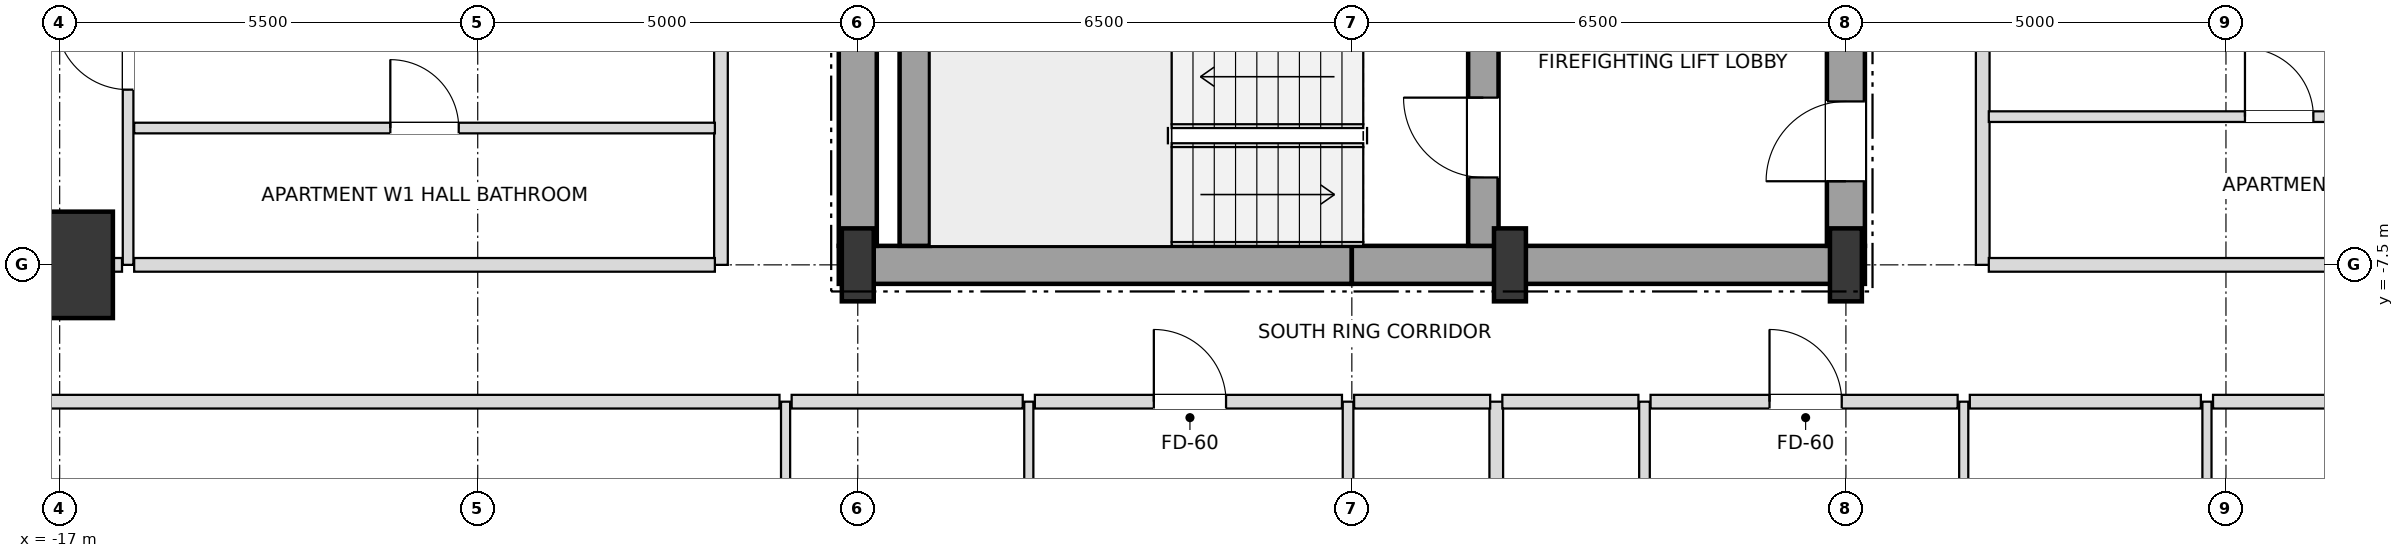
"""IFC4 building model, lengths in metres.
Left out: names, types, materials, properties, quantities, classifications, styles, units other than length and angle.
Written with IfcOpenShell. Run it as: python <this file> out.ifc"""

import sys

from ifc_helpers import new_model, si_unit, direction, frame, frame_2d, origin, origin_2d, place, context, subcontext, project, spatial, rectangle, i_section, extrude, element, fill, save


model = new_model("IFC4")
c1 = context("Model", 3, precision=1e-05, world=origin(), true_north=direction((0.0, 1.0)))
c2 = subcontext(c1, "Body", "Model", "MODEL_VIEW")
j1 = project(units=[si_unit("LENGTHUNIT", "METRE"), si_unit("PLANEANGLEUNIT", "RADIAN")], contexts=[c1])
p1 = place(None, origin())
s1 = spatial("IfcSite", under=j1, at=p1, CompositionType="ELEMENT")
p2 = place(p1, origin())
s2 = spatial("IfcBuilding", under=s1, at=p2, CompositionType="ELEMENT")
p3 = place(p2, frame((0.0, 0.0, 36.0)))
s3 = spatial("IfcBuildingStorey", under=s2, at=p3, CompositionType="ELEMENT", Elevation=36.0)
for number, where, z_axis, x_axis in (
    (1, (-6.5, -7.5, 0.0), (0.0, 0.0, 1.0), (1.0, 0.0, 0.0)),
    (2, (2.08, -7.5, 0.0), (0.0, 0.0, 1.0), (1.0, 0.0, 0.0)),
    (3, (6.5, -7.5, 0.0), (0.0, 0.0, 1.0), (1.0, 0.0, 0.0)),
):
    element("IfcColumn", number, at=place(p3, frame(where, z_axis=z_axis, x_axis=x_axis)), inside=s3, PredefinedType="COLUMN", context=c2, shape_type="SweptSolid", body=[
        extrude(i_section(OverallWidth=0.42, OverallDepth=0.96, WebThickness=0.022, FlangeThickness=0.034, at=origin_2d()), origin(), (0.0, 0.0, 1.0), 3.6),
    ])
p4 = place(p3, frame((-17.0, -7.5, 0.0), z_axis=(0.0, 0.0, 1.0), x_axis=(1.0, 0.0, 0.0)))
e4 = element("IfcColumn", 4, at=p4, inside=s3, PredefinedType="USERDEFINED", context=c2, shape_type="SweptSolid", body=[
    extrude(rectangle(XDim=1.4, YDim=1.4, at=origin_2d()), origin(), (0.0, 0.0, 1.0), 3.6),
])
for number, where, z_axis, x_axis in (
    (5, (-6.75, -7.5, 0.0), (0.0, 0.0, 1.0), (1.0, 0.0, 0.0)),
    (6, (0.0, -7.5, 0.0), (0.0, 0.0, 1.0), (1.0, 0.0, 0.0)),
):
    element("IfcWall", number, at=place(p3, frame(where, z_axis=z_axis, x_axis=x_axis)), inside=s3, PredefinedType="SHEAR", context=c2, shape_type="SweptSolid", body=[
        extrude(rectangle(XDim=6.75, YDim=0.5, at=frame_2d((3.375, 0.0))), origin(), (0.0, 0.0, 1.0), 3.38),
    ])
p5 = place(p3, frame((-6.5, -7.25, 0.0), z_axis=(0.0, 0.0, 1.0), x_axis=(0.0, 1.0, 0.0)))
e7 = element("IfcWall", 7, at=p5, inside=s3, PredefinedType="SHEAR", context=c2, shape_type="SweptSolid", body=[
    extrude(rectangle(XDim=3.55, YDim=0.5, at=frame_2d((1.775, 0.0))), origin(), (0.0, 0.0, 1.0), 3.38),
])
p6 = place(p3, frame((6.5, -7.25, 0.0), z_axis=(0.0, 0.0, 1.0), x_axis=(0.0, 1.0, 0.0)))
e8 = element("IfcWall", 8, at=p6, inside=s3, PredefinedType="SHEAR", context=c2, shape_type="SweptSolid", body=[
    extrude(rectangle(XDim=5.75, YDim=0.5, at=frame_2d((2.875, 0.0))), origin(), (0.0, 0.0, 1.0), 3.38),
])
p7 = place(p6, frame((0.85, 0.0, 0.0)))
e9 = element("IfcOpeningElement", 9, at=p7, cuts=e8, PredefinedType="OPENING", context=c2, shape_type="SweptSolid", body=[
    extrude(rectangle(XDim=1.05, YDim=2.15, at=frame_2d((0.525, 1.075))), frame((0.0, 0.26, 0.0), z_axis=(0.0, -1.0, 0.0), x_axis=(1.0, 0.0, 0.0)), (0.0, 0.0, 1.0), 0.52),
])
p8 = place(p3, frame((-5.75, -7.25, 0.0), z_axis=(0.0, 0.0, 1.0), x_axis=(0.0, 1.0, 0.0)))
e10 = element("IfcWall", 10, at=p8, inside=s3, PredefinedType="SHEAR", context=c2, shape_type="SweptSolid", body=[
    extrude(rectangle(XDim=2.9, YDim=0.4, at=frame_2d((1.45, 0.0))), origin(), (0.0, 0.0, 1.0), 3.38),
])
p9 = place(p3, frame((1.73, -7.25, 0.0), z_axis=(0.0, 0.0, 1.0), x_axis=(0.0, 1.0, 0.0)))
e11 = element("IfcWall", 11, at=p9, inside=s3, PredefinedType="SHEAR", context=c2, shape_type="SweptSolid", body=[
    extrude(rectangle(XDim=3.3, YDim=0.4, at=frame_2d((1.65, 0.0))), origin(), (0.0, 0.0, 1.0), 3.38),
])
p10 = place(p9, frame((0.9, 0.0, 0.0)))
e12 = element("IfcOpeningElement", 12, at=p10, cuts=e11, PredefinedType="OPENING", context=c2, shape_type="SweptSolid", body=[
    extrude(rectangle(XDim=1.05, YDim=2.15, at=frame_2d((0.525, 1.075))), frame((0.0, 0.21, 0.0), z_axis=(0.0, -1.0, 0.0), x_axis=(1.0, 0.0, 0.0)), (0.0, 0.0, 1.0), 0.42),
])
p11 = place(p3, frame((-16.1, -7.5, 0.0), z_axis=(0.0, 0.0, 1.0), x_axis=(0.0, 1.0, 0.0)))
e13 = element("IfcWall", 13, at=p11, inside=s3, PredefinedType="PARTITIONING", context=c2, shape_type="SweptSolid", body=[
    extrude(rectangle(XDim=15.0, YDim=0.14, at=frame_2d((7.5, 0.0))), origin(), (0.0, 0.0, 1.0), 3.38),
])
p12 = place(p11, frame((2.305, 0.0, 0.0)))
e14 = element("IfcOpeningElement", 14, at=p12, cuts=e13, PredefinedType="OPENING", context=c2, shape_type="SweptSolid", body=[
    extrude(rectangle(XDim=0.95, YDim=2.1, at=frame_2d((0.475, 1.05))), frame((0.0, 0.08, 0.0), z_axis=(0.0, -1.0, 0.0), x_axis=(1.0, 0.0, 0.0)), (0.0, 0.0, 1.0), 0.16),
])
p13 = place(p11, frame((10.795, 0.0, 0.0)))
e15 = element("IfcOpeningElement", 15, at=p13, cuts=e13, PredefinedType="OPENING", context=c2, shape_type="SweptSolid", body=[
    extrude(rectangle(XDim=0.95, YDim=2.1, at=frame_2d((0.475, 1.05))), frame((0.0, 0.08, 0.0), z_axis=(0.0, -1.0, 0.0), x_axis=(1.0, 0.0, 0.0)), (0.0, 0.0, 1.0), 0.16),
])
p14 = place(p3, frame((-8.3, -7.5, 0.0), z_axis=(0.0, 0.0, 1.0), x_axis=(0.0, 1.0, 0.0)))
e16 = element("IfcWall", 16, at=p14, inside=s3, PredefinedType="PARTITIONING", context=c2, shape_type="SweptSolid", body=[
    extrude(rectangle(XDim=15.0, YDim=0.18, at=frame_2d((7.5, 0.0))), origin(), (0.0, 0.0, 1.0), 3.38),
])
p15 = place(p14, frame((3.565, 0.0, 0.0)))
e17 = element("IfcOpeningElement", 17, at=p15, cuts=e16, PredefinedType="OPENING", context=c2, shape_type="SweptSolid", body=[
    extrude(rectangle(XDim=0.95, YDim=2.15, at=frame_2d((0.475, 1.075))), frame((0.0, 0.1, 0.0), z_axis=(0.0, -1.0, 0.0), x_axis=(1.0, 0.0, 0.0)), (0.0, 0.0, 1.0), 0.2),
])
p16 = place(p14, frame((11.145, 0.0, 0.0)))
e18 = element("IfcOpeningElement", 18, at=p16, cuts=e16, PredefinedType="OPENING", context=c2, shape_type="SweptSolid", body=[
    extrude(rectangle(XDim=0.95, YDim=2.15, at=frame_2d((0.475, 1.075))), frame((0.0, 0.1, 0.0), z_axis=(0.0, -1.0, 0.0), x_axis=(1.0, 0.0, 0.0)), (0.0, 0.0, 1.0), 0.2),
])
p17 = place(p3, frame((-7.45, -18.9, 0.0), z_axis=(0.0, 0.0, 1.0), x_axis=(0.0, 1.0, 0.0)))
e19 = element("IfcWall", 19, at=p17, inside=s3, PredefinedType="PARTITIONING", context=c2, shape_type="SweptSolid", body=[
    extrude(rectangle(XDim=9.6, YDim=0.12, at=frame_2d((4.8, 0.0))), origin(), (0.0, 0.0, 1.0), 2.816),
])
p18 = place(p17, frame((4.35, 0.0, 0.0)))
e20 = element("IfcOpeningElement", 20, at=p18, cuts=e19, PredefinedType="OPENING", context=c2, shape_type="SweptSolid", body=[
    extrude(rectangle(XDim=0.9, YDim=2.1, at=frame_2d((0.45, 1.05))), frame((0.0, 0.07, 0.0), z_axis=(0.0, -1.0, 0.0), x_axis=(1.0, 0.0, 0.0)), (0.0, 0.0, 1.0), 0.14),
])
p19 = place(p3, frame((-4.25, -24.9, 0.0), z_axis=(0.0, 0.0, 1.0), x_axis=(0.0, 1.0, 0.0)))
e21 = element("IfcWall", 21, at=p19, inside=s3, PredefinedType="PARTITIONING", context=c2, shape_type="SweptSolid", body=[
    extrude(rectangle(XDim=15.6, YDim=0.12, at=frame_2d((7.8, 0.0))), origin(), (0.0, 0.0, 1.0), 2.816),
])
p20 = place(p19, frame((10.325, 0.0, 0.0)))
e22 = element("IfcOpeningElement", 22, at=p20, cuts=e21, PredefinedType="OPENING", context=c2, shape_type="SweptSolid", body=[
    extrude(rectangle(XDim=0.95, YDim=2.1, at=frame_2d((0.475, 1.05))), frame((0.0, 0.07, 0.0), z_axis=(0.0, -1.0, 0.0), x_axis=(1.0, 0.0, 0.0)), (0.0, 0.0, 1.0), 0.14),
])
p21 = place(p19, frame((2.55, 0.0, 0.0)))
e23 = element("IfcOpeningElement", 23, at=p21, cuts=e21, PredefinedType="OPENING", context=c2, shape_type="SweptSolid", body=[
    extrude(rectangle(XDim=0.9, YDim=2.1, at=frame_2d((0.45, 1.05))), frame((0.0, 0.07, 0.0), z_axis=(0.0, -1.0, 0.0), x_axis=(1.0, 0.0, 0.0)), (0.0, 0.0, 1.0), 0.14),
])
p22 = place(p3, frame((-0.05, -18.9, 0.0), z_axis=(0.0, 0.0, 1.0), x_axis=(0.0, 1.0, 0.0)))
e24 = element("IfcWall", 24, at=p22, inside=s3, PredefinedType="PARTITIONING", context=c2, shape_type="SweptSolid", body=[
    extrude(rectangle(XDim=9.6, YDim=0.14, at=frame_2d((4.8, 0.0))), origin(), (0.0, 0.0, 1.0), 2.948),
])
p23 = place(p22, frame((4.35, 0.0, 0.0)))
e25 = element("IfcOpeningElement", 25, at=p23, cuts=e24, PredefinedType="OPENING", context=c2, shape_type="SweptSolid", body=[
    extrude(rectangle(XDim=0.9, YDim=2.1, at=frame_2d((0.45, 1.05))), frame((0.0, 0.08, 0.0), z_axis=(0.0, -1.0, 0.0), x_axis=(1.0, 0.0, 0.0)), (0.0, 0.0, 1.0), 0.16),
])
p24 = place(p3, frame((1.9, -24.9, 0.0), z_axis=(0.0, 0.0, 1.0), x_axis=(0.0, 1.0, 0.0)))
e26 = element("IfcWall", 26, at=p24, inside=s3, PredefinedType="PARTITIONING", context=c2, shape_type="SweptSolid", body=[
    extrude(rectangle(XDim=15.6, YDim=0.18, at=frame_2d((7.8, 0.0))), origin(), (0.0, 0.0, 1.0), 2.816),
])
p25 = place(p3, frame((3.85, -18.9, 0.0), z_axis=(0.0, 0.0, 1.0), x_axis=(0.0, 1.0, 0.0)))
e27 = element("IfcWall", 27, at=p25, inside=s3, PredefinedType="PARTITIONING", context=c2, shape_type="SweptSolid", body=[
    extrude(rectangle(XDim=9.6, YDim=0.14, at=frame_2d((4.8, 0.0))), origin(), (0.0, 0.0, 1.0), 2.948),
])
p26 = place(p25, frame((4.35, 0.0, 0.0)))
e28 = element("IfcOpeningElement", 28, at=p26, cuts=e27, PredefinedType="OPENING", context=c2, shape_type="SweptSolid", body=[
    extrude(rectangle(XDim=0.9, YDim=2.1, at=frame_2d((0.45, 1.05))), frame((0.0, 0.08, 0.0), z_axis=(0.0, -1.0, 0.0), x_axis=(1.0, 0.0, 0.0)), (0.0, 0.0, 1.0), 0.16),
])
p27 = place(p3, frame((8.05, -24.9, 0.0), z_axis=(0.0, 0.0, 1.0), x_axis=(0.0, 1.0, 0.0)))
e29 = element("IfcWall", 29, at=p27, inside=s3, PredefinedType="PARTITIONING", context=c2, shape_type="SweptSolid", body=[
    extrude(rectangle(XDim=15.6, YDim=0.12, at=frame_2d((7.8, 0.0))), origin(), (0.0, 0.0, 1.0), 2.816),
])
p28 = place(p27, frame((10.325, 0.0, 0.0)))
e30 = element("IfcOpeningElement", 30, at=p28, cuts=e29, PredefinedType="OPENING", context=c2, shape_type="SweptSolid", body=[
    extrude(rectangle(XDim=0.95, YDim=2.1, at=frame_2d((0.475, 1.05))), frame((0.0, 0.07, 0.0), z_axis=(0.0, -1.0, 0.0), x_axis=(1.0, 0.0, 0.0)), (0.0, 0.0, 1.0), 0.14),
])
p29 = place(p27, frame((2.55, 0.0, 0.0)))
e31 = element("IfcOpeningElement", 31, at=p29, cuts=e29, PredefinedType="OPENING", context=c2, shape_type="SweptSolid", body=[
    extrude(rectangle(XDim=0.9, YDim=2.1, at=frame_2d((0.45, 1.05))), frame((0.0, 0.07, 0.0), z_axis=(0.0, -1.0, 0.0), x_axis=(1.0, 0.0, 0.0)), (0.0, 0.0, 1.0), 0.14),
])
p30 = place(p3, frame((8.3, -7.5, 0.0), z_axis=(0.0, 0.0, 1.0), x_axis=(0.0, 1.0, 0.0)))
e32 = element("IfcWall", 32, at=p30, inside=s3, PredefinedType="PARTITIONING", context=c2, shape_type="SweptSolid", body=[
    extrude(rectangle(XDim=15.0, YDim=0.18, at=frame_2d((7.5, 0.0))), origin(), (0.0, 0.0, 1.0), 3.38),
])
p31 = place(p30, frame((3.475, 0.0, 0.0)))
e33 = element("IfcOpeningElement", 33, at=p31, cuts=e32, PredefinedType="OPENING", context=c2, shape_type="SweptSolid", body=[
    extrude(rectangle(XDim=0.95, YDim=2.15, at=frame_2d((0.475, 1.075))), frame((0.0, 0.1, 0.0), z_axis=(0.0, -1.0, 0.0), x_axis=(1.0, 0.0, 0.0)), (0.0, 0.0, 1.0), 0.2),
])
p32 = place(p3, frame((11.25, -18.9, 0.0), z_axis=(0.0, 0.0, 1.0), x_axis=(0.0, 1.0, 0.0)))
e34 = element("IfcWall", 34, at=p32, inside=s3, PredefinedType="PARTITIONING", context=c2, shape_type="SweptSolid", body=[
    extrude(rectangle(XDim=9.6, YDim=0.12, at=frame_2d((4.8, 0.0))), origin(), (0.0, 0.0, 1.0), 2.736),
])
p33 = place(p32, frame((4.325, 0.0, 0.0)))
e35 = element("IfcOpeningElement", 35, at=p33, cuts=e34, PredefinedType="OPENING", context=c2, shape_type="SweptSolid", body=[
    extrude(rectangle(XDim=0.95, YDim=2.1, at=frame_2d((0.475, 1.05))), frame((0.0, 0.07, 0.0), z_axis=(0.0, -1.0, 0.0), x_axis=(1.0, 0.0, 0.0)), (0.0, 0.0, 1.0), 0.14),
])
p34 = place(p3, frame((-18.32, -9.3, 0.0), z_axis=(0.0, 0.0, 1.0), x_axis=(1.0, 0.0, 0.0)))
e36 = element("IfcWall", 36, at=p34, inside=s3, PredefinedType="PARTITIONING", context=c2, shape_type="SweptSolid", body=[
    extrude(rectangle(XDim=10.79, YDim=0.18, at=frame_2d((5.395, 0.0))), origin(), (0.0, 0.0, 1.0), 2.816),
])
p35 = place(p3, frame((-7.37, -9.3, 0.0), z_axis=(0.0, 0.0, 1.0), x_axis=(1.0, 0.0, 0.0)))
e37 = element("IfcWall", 37, at=p35, inside=s3, PredefinedType="PARTITIONING", context=c2, shape_type="SweptSolid", body=[
    extrude(rectangle(XDim=3.04, YDim=0.18, at=frame_2d((1.52, 0.0))), origin(), (0.0, 0.0, 1.0), 2.816),
])
p36 = place(p3, frame((-4.17, -9.3, 0.0), z_axis=(0.0, 0.0, 1.0), x_axis=(1.0, 0.0, 0.0)))
e38 = element("IfcWall", 38, at=p36, inside=s3, PredefinedType="PARTITIONING", context=c2, shape_type="SweptSolid", body=[
    extrude(rectangle(XDim=4.04, YDim=0.18, at=frame_2d((2.02, 0.0))), origin(), (0.0, 0.0, 1.0), 3.38),
])
p37 = place(p36, frame((1.565, 0.0, 0.0)))
e39 = element("IfcOpeningElement", 39, at=p37, cuts=e38, PredefinedType="OPENING", context=c2, shape_type="SweptSolid", body=[
    extrude(rectangle(XDim=0.95, YDim=2.15, at=frame_2d((0.475, 1.075))), frame((0.0, 0.1, 0.0), z_axis=(0.0, -1.0, 0.0), x_axis=(1.0, 0.0, 0.0)), (0.0, 0.0, 1.0), 0.2),
])
for number, where, z_axis, x_axis in (
    (40, (0.03, -9.3, 0.0), (0.0, 0.0, 1.0), (1.0, 0.0, 0.0)),
    (41, (1.98, -9.3, 0.0), (0.0, 0.0, 1.0), (1.0, 0.0, 0.0)),
):
    element("IfcWall", number, at=place(p3, frame(where, z_axis=z_axis, x_axis=x_axis)), inside=s3, PredefinedType="PARTITIONING", context=c2, shape_type="SweptSolid", body=[
        extrude(rectangle(XDim=1.79, YDim=0.18, at=frame_2d((0.895, 0.0))), origin(), (0.0, 0.0, 1.0), 3.38),
    ])
p38 = place(p3, frame((3.93, -9.3, 0.0), z_axis=(0.0, 0.0, 1.0), x_axis=(1.0, 0.0, 0.0)))
e42 = element("IfcWall", 42, at=p38, inside=s3, PredefinedType="PARTITIONING", context=c2, shape_type="SweptSolid", body=[
    extrude(rectangle(XDim=4.04, YDim=0.18, at=frame_2d((2.02, 0.0))), origin(), (0.0, 0.0, 1.0), 2.816),
])
p39 = place(p38, frame((1.565, 0.0, 0.0)))
e43 = element("IfcOpeningElement", 43, at=p39, cuts=e42, PredefinedType="OPENING", context=c2, shape_type="SweptSolid", body=[
    extrude(rectangle(XDim=0.95, YDim=2.15, at=frame_2d((0.475, 1.075))), frame((0.0, 0.1, 0.0), z_axis=(0.0, -1.0, 0.0), x_axis=(1.0, 0.0, 0.0)), (0.0, 0.0, 1.0), 0.2),
])
p40 = place(p3, frame((8.13, -9.3, 0.0), z_axis=(0.0, 0.0, 1.0), x_axis=(1.0, 0.0, 0.0)))
e44 = element("IfcWall", 44, at=p40, inside=s3, PredefinedType="PARTITIONING", context=c2, shape_type="SweptSolid", body=[
    extrude(rectangle(XDim=3.04, YDim=0.18, at=frame_2d((1.52, 0.0))), origin(), (0.0, 0.0, 1.0), 3.38),
])
p41 = place(p3, frame((11.33, -9.3, 0.0), z_axis=(0.0, 0.0, 1.0), x_axis=(1.0, 0.0, 0.0)))
e45 = element("IfcWall", 45, at=p41, inside=s3, PredefinedType="PARTITIONING", context=c2, shape_type="SweptSolid", body=[
    extrude(rectangle(XDim=6.99, YDim=0.18, at=frame_2d((3.495, 0.0))), origin(), (0.0, 0.0, 1.0), 2.816),
])
p42 = place(p3, frame((-21.9, -7.5, 0.0), z_axis=(0.0, 0.0, 1.0), x_axis=(1.0, 0.0, 0.0)))
e46 = element("IfcWall", 46, at=p42, inside=s3, PredefinedType="PARTITIONING", context=c2, shape_type="SweptSolid", body=[
    extrude(rectangle(XDim=5.72, YDim=0.18, at=frame_2d((2.86, 0.0))), origin(), (0.0, 0.0, 1.0), 2.816),
])
for number, where, z_axis, x_axis in (
    (47, (-16.02, -7.5, 0.0), (0.0, 0.0, 1.0), (1.0, 0.0, 0.0)),
    (48, (8.38, -7.5, 0.0), (0.0, 0.0, 1.0), (1.0, 0.0, 0.0)),
):
    element("IfcWall", number, at=place(p3, frame(where, z_axis=z_axis, x_axis=x_axis)), inside=s3, PredefinedType="PARTITIONING", context=c2, shape_type="SweptSolid", body=[
        extrude(rectangle(XDim=7.64, YDim=0.18, at=frame_2d((3.82, 0.0))), origin(), (0.0, 0.0, 1.0), 2.816),
    ])
p43 = place(p3, frame((-16.02, -5.7, 0.0), z_axis=(0.0, 0.0, 1.0), x_axis=(1.0, 0.0, 0.0)))
e49 = element("IfcWall", 49, at=p43, inside=s3, PredefinedType="PARTITIONING", context=c2, shape_type="SweptSolid", body=[
    extrude(rectangle(XDim=7.64, YDim=0.14, at=frame_2d((3.82, 0.0))), origin(), (0.0, 0.0, 1.0), 2.948),
])
p44 = place(p43, frame((3.37, 0.0, 0.0)))
e50 = element("IfcOpeningElement", 50, at=p44, cuts=e49, PredefinedType="OPENING", context=c2, shape_type="SweptSolid", body=[
    extrude(rectangle(XDim=0.9, YDim=2.1, at=frame_2d((0.45, 1.05))), frame((0.0, 0.08, 0.0), z_axis=(0.0, -1.0, 0.0), x_axis=(1.0, 0.0, 0.0)), (0.0, 0.0, 1.0), 0.16),
])
p45 = place(p3, frame((8.38, -5.55, 0.0), z_axis=(0.0, 0.0, 1.0), x_axis=(1.0, 0.0, 0.0)))
e51 = element("IfcWall", 51, at=p45, inside=s3, PredefinedType="PARTITIONING", context=c2, shape_type="SweptSolid", body=[
    extrude(rectangle(XDim=7.64, YDim=0.14, at=frame_2d((3.82, 0.0))), origin(), (0.0, 0.0, 1.0), 2.948),
])
p46 = place(p45, frame((3.37, 0.0, 0.0)))
e52 = element("IfcOpeningElement", 52, at=p46, cuts=e51, PredefinedType="OPENING", context=c2, shape_type="SweptSolid", body=[
    extrude(rectangle(XDim=0.9, YDim=2.1, at=frame_2d((0.45, 1.05))), frame((0.0, 0.08, 0.0), z_axis=(0.0, -1.0, 0.0), x_axis=(1.0, 0.0, 0.0)), (0.0, 0.0, 1.0), 0.16),
])
p47 = place(p7, origin())
e53 = element("IfcDoor", 53, at=p47, inside=s3, OperationType="SINGLE_SWING_LEFT", PredefinedType="DOOR", context=c2, shape_type="SweptSolid", body=[
    extrude(rectangle(XDim=1.05, YDim=2.15, at=frame_2d((0.525, 1.075))), frame((0.0, 0.025, 0.0), z_axis=(0.0, -1.0, 0.0), x_axis=(1.0, 0.0, 0.0)), (0.0, 0.0, 1.0), 0.05),
])
fill(e9, e53)
p48 = place(p10, origin())
e54 = element("IfcDoor", 54, at=p48, inside=s3, OperationType="SINGLE_SWING_RIGHT", PredefinedType="DOOR", context=c2, shape_type="SweptSolid", body=[
    extrude(rectangle(XDim=1.05, YDim=2.15, at=frame_2d((0.525, 1.075))), frame((0.0, 0.025, 0.0), z_axis=(0.0, -1.0, 0.0), x_axis=(1.0, 0.0, 0.0)), (0.0, 0.0, 1.0), 0.05),
])
fill(e12, e54)
p49 = place(p37, origin())
e55 = element("IfcDoor", 55, at=p49, inside=s3, OperationType="SINGLE_SWING_LEFT", PredefinedType="DOOR", context=c2, shape_type="SweptSolid", body=[
    extrude(rectangle(XDim=0.95, YDim=2.15, at=frame_2d((0.475, 1.075))), frame((0.0, 0.025, 0.0), z_axis=(0.0, -1.0, 0.0), x_axis=(1.0, 0.0, 0.0)), (0.0, 0.0, 1.0), 0.05),
])
fill(e39, e55)
p50 = place(p39, origin())
e56 = element("IfcDoor", 56, at=p50, inside=s3, OperationType="SINGLE_SWING_LEFT", PredefinedType="DOOR", context=c2, shape_type="SweptSolid", body=[
    extrude(rectangle(XDim=0.95, YDim=2.15, at=frame_2d((0.475, 1.075))), frame((0.0, 0.025, 0.0), z_axis=(0.0, -1.0, 0.0), x_axis=(1.0, 0.0, 0.0)), (0.0, 0.0, 1.0), 0.05),
])
fill(e43, e56)
p51 = place(p44, origin())
e57 = element("IfcDoor", 57, at=p51, inside=s3, OperationType="SINGLE_SWING_LEFT", PredefinedType="DOOR", context=c2, shape_type="SweptSolid", body=[
    extrude(rectangle(XDim=0.9, YDim=2.1, at=frame_2d((0.45, 1.05))), frame((0.0, 0.025, 0.0), z_axis=(0.0, -1.0, 0.0), x_axis=(1.0, 0.0, 0.0)), (0.0, 0.0, 1.0), 0.05),
])
fill(e50, e57)
p52 = place(p12, origin())
e58 = element("IfcDoor", 58, at=p52, inside=s3, OperationType="SINGLE_SWING_RIGHT", PredefinedType="DOOR", context=c2, shape_type="SweptSolid", body=[
    extrude(rectangle(XDim=0.95, YDim=2.1, at=frame_2d((0.475, 1.05))), frame((0.0, 0.025, 0.0), z_axis=(0.0, -1.0, 0.0), x_axis=(1.0, 0.0, 0.0)), (0.0, 0.0, 1.0), 0.05),
])
fill(e14, e58)
p53 = place(p46, origin())
e59 = element("IfcDoor", 59, at=p53, inside=s3, OperationType="SINGLE_SWING_LEFT", PredefinedType="DOOR", context=c2, shape_type="SweptSolid", body=[
    extrude(rectangle(XDim=0.9, YDim=2.1, at=frame_2d((0.45, 1.05))), frame((0.0, 0.025, 0.0), z_axis=(0.0, -1.0, 0.0), x_axis=(1.0, 0.0, 0.0)), (0.0, 0.0, 1.0), 0.05),
])
fill(e52, e59)
save(model, sys.argv[1])
